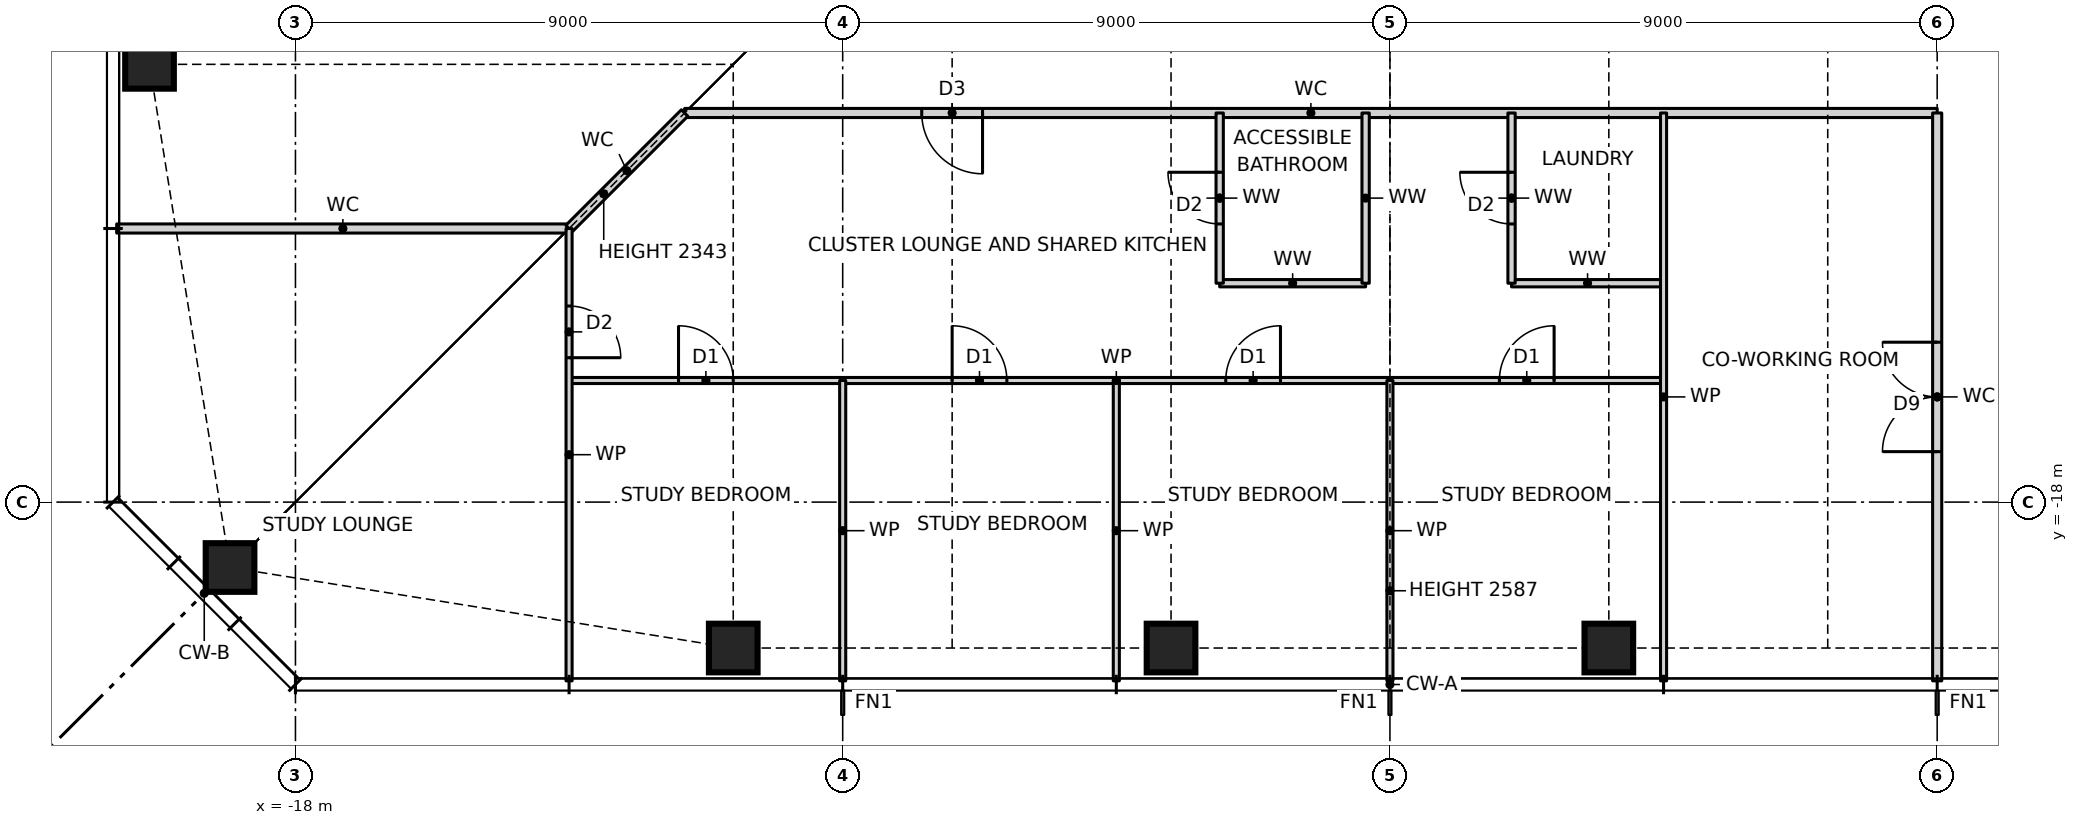
"""IFC4 building model, lengths in metres.
Left out: names, types, materials, properties, quantities, classifications, styles, units other than length and angle.
Written with IfcOpenShell. Run it as: python <this file> out.ifc"""

import sys

from ifc_helpers import new_model, si_unit, direction, frame, frame_2d, origin, origin_2d, place, context, subcontext, project, spatial, rectangle, hollow_rectangle, extrude, element, fill, save


model = new_model("IFC4")
c1 = context("Model", 3, precision=1e-05, world=origin(), true_north=direction((0.0, 1.0)))
c2 = subcontext(c1, "Body", "Model", "MODEL_VIEW")
j1 = project(units=[si_unit("LENGTHUNIT", "METRE"), si_unit("PLANEANGLEUNIT", "RADIAN")], contexts=[c1])
p1 = place(None, origin())
s1 = spatial("IfcSite", under=j1, at=p1, CompositionType="ELEMENT")
p2 = place(p1, origin())
s2 = spatial("IfcBuilding", under=s1, at=p2, CompositionType="ELEMENT")
p3 = place(p2, frame((0.0, 0.0, 119.0)))
s3 = spatial("IfcBuildingStorey", under=s2, at=p3, CompositionType="ELEMENT", Elevation=119.0)
for number, where, z_axis, x_axis in (
    (1, (-19.076, -19.076, 0.0), (0.0, 0.0, 1.0), (1.0, 0.0, 0.0)),
    (2, (-10.8, -20.4, 0.0), (0.0, 0.0, 1.0), (1.0, 0.0, 0.0)),
    (3, (-3.6, -20.4, 0.0), (0.0, 0.0, 1.0), (1.0, 0.0, 0.0)),
    (4, (3.6, -20.4, 0.0), (0.0, 0.0, 1.0), (1.0, 0.0, 0.0)),
    (5, (-20.4, -10.8, 0.0), (0.0, 0.0, 1.0), (1.0, 0.0, 0.0)),
):
    element("IfcColumn", number, at=place(p3, frame(where, z_axis=z_axis, x_axis=x_axis)), inside=s3, PredefinedType="COLUMN", context=c2, shape_type="SweptSolid", body=[
        extrude(hollow_rectangle(XDim=0.8, YDim=0.8, WallThickness=0.07, at=origin_2d()), origin(), (0.0, 0.0, 1.0), 3.5),
    ])
p4 = place(p3, frame((-13.5, -16.0, 0.0), z_axis=(0.0, 0.0, 1.0), x_axis=(1.0, 0.0, 0.0)))
e6 = element("IfcWall", 6, at=p4, inside=s3, PredefinedType="PARTITIONING", context=c2, shape_type="SweptSolid", body=[
    extrude(rectangle(XDim=18.0, YDim=0.1, at=frame_2d((9.0, 0.0))), origin(), (0.0, 0.0, 1.0), 3.27),
])
p5 = place(p4, frame((1.8, 0.0, 0.0)))
e7 = element("IfcOpeningElement", 7, at=p5, cuts=e6, PredefinedType="OPENING", context=c2, shape_type="SweptSolid", body=[
    extrude(rectangle(XDim=0.9, YDim=2.1, at=frame_2d((0.45, 1.05))), frame((0.0, 0.06, 0.0), z_axis=(0.0, -1.0, 0.0), x_axis=(1.0, 0.0, 0.0)), (0.0, 0.0, 1.0), 0.12),
])
p6 = place(p4, frame((6.3, 0.0, 0.0)))
e8 = element("IfcOpeningElement", 8, at=p6, cuts=e6, PredefinedType="OPENING", context=c2, shape_type="SweptSolid", body=[
    extrude(rectangle(XDim=0.9, YDim=2.1, at=frame_2d((0.45, 1.05))), frame((0.0, 0.06, 0.0), z_axis=(0.0, -1.0, 0.0), x_axis=(1.0, 0.0, 0.0)), (0.0, 0.0, 1.0), 0.12),
])
p7 = place(p4, frame((10.8, 0.0, 0.0)))
e9 = element("IfcOpeningElement", 9, at=p7, cuts=e6, PredefinedType="OPENING", context=c2, shape_type="SweptSolid", body=[
    extrude(rectangle(XDim=0.9, YDim=2.1, at=frame_2d((0.45, 1.05))), frame((0.0, 0.06, 0.0), z_axis=(0.0, -1.0, 0.0), x_axis=(1.0, 0.0, 0.0)), (0.0, 0.0, 1.0), 0.12),
])
p8 = place(p4, frame((15.3, 0.0, 0.0)))
e10 = element("IfcOpeningElement", 10, at=p8, cuts=e6, PredefinedType="OPENING", context=c2, shape_type="SweptSolid", body=[
    extrude(rectangle(XDim=0.9, YDim=2.1, at=frame_2d((0.45, 1.05))), frame((0.0, 0.06, 0.0), z_axis=(0.0, -1.0, 0.0), x_axis=(1.0, 0.0, 0.0)), (0.0, 0.0, 1.0), 0.12),
])
p9 = place(p3, frame((-2.8, -14.4, 0.0), z_axis=(0.0, 0.0, 1.0), x_axis=(1.0, 0.0, 0.0)))
e11 = element("IfcWall", 11, at=p9, inside=s3, PredefinedType="PARTITIONING", context=c2, shape_type="SweptSolid", body=[
    extrude(rectangle(XDim=2.4, YDim=0.12, at=frame_2d((1.2, 0.0))), origin(), (0.0, 0.0, 1.0), 3.27),
])
p10 = place(p3, frame((2.0, -14.4, 0.0), z_axis=(0.0, 0.0, 1.0), x_axis=(1.0, 0.0, 0.0)))
e12 = element("IfcWall", 12, at=p10, inside=s3, PredefinedType="PARTITIONING", context=c2, shape_type="SweptSolid", body=[
    extrude(rectangle(XDim=2.5, YDim=0.12, at=frame_2d((1.25, 0.0))), origin(), (0.0, 0.0, 1.0), 3.27),
])
p11 = place(p3, frame((-20.94, -13.5, 0.0), z_axis=(0.0, 0.0, 1.0), x_axis=(1.0, 0.0, 0.0)))
e13 = element("IfcWall", 13, at=p11, inside=s3, PredefinedType="PARTITIONING", context=c2, shape_type="SweptSolid", body=[
    extrude(rectangle(XDim=7.44, YDim=0.15, at=frame_2d((3.72, 0.0))), origin(), (0.0, 0.0, 1.0), 3.27),
])
p12 = place(p3, frame((-11.6, -11.6, 0.0), z_axis=(0.0, 0.0, 1.0), x_axis=(1.0, 0.0, 0.0)))
e14 = element("IfcWall", 14, at=p12, inside=s3, PredefinedType="PARTITIONING", context=c2, shape_type="SweptSolid", body=[
    extrude(rectangle(XDim=20.6, YDim=0.15, at=frame_2d((10.3, 0.0))), origin(), (0.0, 0.0, 1.0), 3.27),
])
p13 = place(p12, frame((3.9, 0.0, 0.0)))
e15 = element("IfcOpeningElement", 15, at=p13, cuts=e14, PredefinedType="OPENING", context=c2, shape_type="SweptSolid", body=[
    extrude(rectangle(XDim=1.0, YDim=2.1, at=frame_2d((0.5, 1.05))), frame((0.0, 0.085, 0.0), z_axis=(0.0, -1.0, 0.0), x_axis=(1.0, 0.0, 0.0)), (0.0, 0.0, 1.0), 0.17),
])
p14 = place(p3, frame((-13.5, -13.5, 0.0), z_axis=(0.0, 0.0, 1.0), x_axis=(0.707106781187, 0.707106781187, 0.0)))
e16 = element("IfcWall", 16, at=p14, inside=s3, PredefinedType="PARTITIONING", context=c2, shape_type="SweptSolid", body=[
    extrude(rectangle(XDim=2.687, YDim=0.15, at=frame_2d((1.343, 0.0))), origin(), (0.0, 0.0, 1.0), 2.343),
])
p15 = place(p3, frame((9.0, -20.94, 0.0), z_axis=(0.0, 0.0, 1.0), x_axis=(0.0, 1.0, 0.0)))
e17 = element("IfcWall", 17, at=p15, inside=s3, PredefinedType="PARTITIONING", context=c2, shape_type="SweptSolid", body=[
    extrude(rectangle(XDim=9.34, YDim=0.15, at=frame_2d((4.67, 0.0))), origin(), (0.0, 0.0, 1.0), 3.27),
])
p16 = place(p15, frame((3.77, 0.0, 0.0)))
e18 = element("IfcOpeningElement", 18, at=p16, cuts=e17, PredefinedType="OPENING", context=c2, shape_type="SweptSolid", body=[
    extrude(rectangle(XDim=1.8, YDim=2.1, at=frame_2d((0.9, 1.05))), frame((0.0, 0.085, 0.0), z_axis=(0.0, -1.0, 0.0), x_axis=(1.0, 0.0, 0.0)), (0.0, 0.0, 1.0), 0.17),
])
p17 = place(p3, frame((4.5, -20.94, 0.0), z_axis=(0.0, 0.0, 1.0), x_axis=(0.0, 1.0, 0.0)))
e19 = element("IfcWall", 19, at=p17, inside=s3, PredefinedType="PARTITIONING", context=c2, shape_type="SweptSolid", body=[
    extrude(rectangle(XDim=9.34, YDim=0.1, at=frame_2d((4.67, 0.0))), origin(), (0.0, 0.0, 1.0), 3.27),
])
p18 = place(p3, frame((2.0, -14.4, 0.0), z_axis=(0.0, 0.0, 1.0), x_axis=(0.0, 1.0, 0.0)))
e20 = element("IfcWall", 20, at=p18, inside=s3, PredefinedType="PARTITIONING", context=c2, shape_type="SweptSolid", body=[
    extrude(rectangle(XDim=2.8, YDim=0.12, at=frame_2d((1.4, 0.0))), origin(), (0.0, 0.0, 1.0), 3.27),
])
p19 = place(p18, frame((0.975, 0.0, 0.0)))
e21 = element("IfcOpeningElement", 21, at=p19, cuts=e20, PredefinedType="OPENING", context=c2, shape_type="SweptSolid", body=[
    extrude(rectangle(XDim=0.85, YDim=2.1, at=frame_2d((0.425, 1.05))), frame((0.0, 0.07, 0.0), z_axis=(0.0, -1.0, 0.0), x_axis=(1.0, 0.0, 0.0)), (0.0, 0.0, 1.0), 0.14),
])
p20 = place(p3, frame((0.0, -20.94, 0.0), z_axis=(0.0, 0.0, 1.0), x_axis=(0.0, 1.0, 0.0)))
e22 = element("IfcWall", 22, at=p20, inside=s3, PredefinedType="PARTITIONING", context=c2, shape_type="SweptSolid", body=[
    extrude(rectangle(XDim=4.94, YDim=0.1, at=frame_2d((2.47, 0.0))), origin(), (0.0, 0.0, 1.0), 2.587),
])
p21 = place(p3, frame((-0.4, -14.4, 0.0), z_axis=(0.0, 0.0, 1.0), x_axis=(0.0, 1.0, 0.0)))
e23 = element("IfcWall", 23, at=p21, inside=s3, PredefinedType="PARTITIONING", context=c2, shape_type="SweptSolid", body=[
    extrude(rectangle(XDim=2.8, YDim=0.12, at=frame_2d((1.4, 0.0))), origin(), (0.0, 0.0, 1.0), 3.27),
])
p22 = place(p3, frame((-2.8, -14.4, 0.0), z_axis=(0.0, 0.0, 1.0), x_axis=(0.0, 1.0, 0.0)))
e24 = element("IfcWall", 24, at=p22, inside=s3, PredefinedType="PARTITIONING", context=c2, shape_type="SweptSolid", body=[
    extrude(rectangle(XDim=2.8, YDim=0.12, at=frame_2d((1.4, 0.0))), origin(), (0.0, 0.0, 1.0), 3.27),
])
p23 = place(p22, frame((0.975, 0.0, 0.0)))
e25 = element("IfcOpeningElement", 25, at=p23, cuts=e24, PredefinedType="OPENING", context=c2, shape_type="SweptSolid", body=[
    extrude(rectangle(XDim=0.85, YDim=2.1, at=frame_2d((0.425, 1.05))), frame((0.0, 0.07, 0.0), z_axis=(0.0, -1.0, 0.0), x_axis=(1.0, 0.0, 0.0)), (0.0, 0.0, 1.0), 0.14),
])
for number, where, z_axis, x_axis in (
    (26, (-4.5, -20.94, 0.0), (0.0, 0.0, 1.0), (0.0, 1.0, 0.0)),
    (27, (-9.0, -20.94, 0.0), (0.0, 0.0, 1.0), (0.0, 1.0, 0.0)),
):
    element("IfcWall", number, at=place(p3, frame(where, z_axis=z_axis, x_axis=x_axis)), inside=s3, PredefinedType="PARTITIONING", context=c2, shape_type="SweptSolid", body=[
        extrude(rectangle(XDim=4.94, YDim=0.1, at=frame_2d((2.47, 0.0))), origin(), (0.0, 0.0, 1.0), 3.27),
    ])
p24 = place(p3, frame((-13.5, -20.94, 0.0), z_axis=(0.0, 0.0, 1.0), x_axis=(0.0, 1.0, 0.0)))
e28 = element("IfcWall", 28, at=p24, inside=s3, PredefinedType="PARTITIONING", context=c2, shape_type="SweptSolid", body=[
    extrude(rectangle(XDim=7.44, YDim=0.1, at=frame_2d((3.72, 0.0))), origin(), (0.0, 0.0, 1.0), 3.27),
])
p25 = place(p24, frame((5.315, 0.0, 0.0)))
e29 = element("IfcOpeningElement", 29, at=p25, cuts=e28, PredefinedType="OPENING", context=c2, shape_type="SweptSolid", body=[
    extrude(rectangle(XDim=0.85, YDim=2.1, at=frame_2d((0.425, 1.05))), frame((0.0, 0.06, 0.0), z_axis=(0.0, -1.0, 0.0), x_axis=(1.0, 0.0, 0.0)), (0.0, 0.0, 1.0), 0.12),
])
p26 = place(p5, origin())
e30 = element("IfcDoor", 30, at=p26, inside=s3, OperationType="SINGLE_SWING_LEFT", PredefinedType="DOOR", context=c2, shape_type="SweptSolid", body=[
    extrude(rectangle(XDim=0.9, YDim=2.1, at=frame_2d((0.45, 1.05))), frame((0.0, 0.025, 0.0), z_axis=(0.0, -1.0, 0.0), x_axis=(1.0, 0.0, 0.0)), (0.0, 0.0, 1.0), 0.05),
])
fill(e7, e30)
p27 = place(p6, origin())
e31 = element("IfcDoor", 31, at=p27, inside=s3, OperationType="SINGLE_SWING_LEFT", PredefinedType="DOOR", context=c2, shape_type="SweptSolid", body=[
    extrude(rectangle(XDim=0.9, YDim=2.1, at=frame_2d((0.45, 1.05))), frame((0.0, 0.025, 0.0), z_axis=(0.0, -1.0, 0.0), x_axis=(1.0, 0.0, 0.0)), (0.0, 0.0, 1.0), 0.05),
])
fill(e8, e31)
p28 = place(p7, origin())
e32 = element("IfcDoor", 32, at=p28, inside=s3, OperationType="SINGLE_SWING_RIGHT", PredefinedType="DOOR", context=c2, shape_type="SweptSolid", body=[
    extrude(rectangle(XDim=0.9, YDim=2.1, at=frame_2d((0.45, 1.05))), frame((0.0, 0.025, 0.0), z_axis=(0.0, -1.0, 0.0), x_axis=(1.0, 0.0, 0.0)), (0.0, 0.0, 1.0), 0.05),
])
fill(e9, e32)
p29 = place(p8, origin())
e33 = element("IfcDoor", 33, at=p29, inside=s3, OperationType="SINGLE_SWING_RIGHT", PredefinedType="DOOR", context=c2, shape_type="SweptSolid", body=[
    extrude(rectangle(XDim=0.9, YDim=2.1, at=frame_2d((0.45, 1.05))), frame((0.0, 0.025, 0.0), z_axis=(0.0, -1.0, 0.0), x_axis=(1.0, 0.0, 0.0)), (0.0, 0.0, 1.0), 0.05),
])
fill(e10, e33)
p30 = place(p13, frame((1.0, 0.0, 0.0), z_axis=(0.0, 0.0, 1.0), x_axis=(-1.0, 0.0, 0.0)))
e34 = element("IfcDoor", 34, at=p30, inside=s3, OperationType="SINGLE_SWING_LEFT", PredefinedType="DOOR", context=c2, shape_type="SweptSolid", body=[
    extrude(rectangle(XDim=1.0, YDim=2.1, at=frame_2d((0.5, 1.05))), frame((0.0, 0.025, 0.0), z_axis=(0.0, -1.0, 0.0), x_axis=(1.0, 0.0, 0.0)), (0.0, 0.0, 1.0), 0.05),
])
fill(e15, e34)
p31 = place(p23, origin())
e35 = element("IfcDoor", 35, at=p31, inside=s3, OperationType="SINGLE_SWING_RIGHT", PredefinedType="DOOR", context=c2, shape_type="SweptSolid", body=[
    extrude(rectangle(XDim=0.85, YDim=2.1, at=frame_2d((0.425, 1.05))), frame((0.0, 0.025, 0.0), z_axis=(0.0, -1.0, 0.0), x_axis=(1.0, 0.0, 0.0)), (0.0, 0.0, 1.0), 0.05),
])
fill(e25, e35)
p32 = place(p19, origin())
e36 = element("IfcDoor", 36, at=p32, inside=s3, OperationType="SINGLE_SWING_RIGHT", PredefinedType="DOOR", context=c2, shape_type="SweptSolid", body=[
    extrude(rectangle(XDim=0.85, YDim=2.1, at=frame_2d((0.425, 1.05))), frame((0.0, 0.025, 0.0), z_axis=(0.0, -1.0, 0.0), x_axis=(1.0, 0.0, 0.0)), (0.0, 0.0, 1.0), 0.05),
])
fill(e21, e36)
p33 = place(p16, origin())
e37 = element("IfcDoor", 37, at=p33, inside=s3, OperationType="DOUBLE_DOOR_SINGLE_SWING", PredefinedType="DOOR", context=c2, shape_type="SweptSolid", body=[
    extrude(rectangle(XDim=1.8, YDim=2.1, at=frame_2d((0.9, 1.05))), frame((0.0, 0.025, 0.0), z_axis=(0.0, -1.0, 0.0), x_axis=(1.0, 0.0, 0.0)), (0.0, 0.0, 1.0), 0.05),
])
fill(e18, e37)
p34 = place(p25, frame((0.85, 0.0, 0.0), z_axis=(0.0, 0.0, 1.0), x_axis=(-1.0, 0.0, 0.0)))
e38 = element("IfcDoor", 38, at=p34, inside=s3, OperationType="SINGLE_SWING_RIGHT", PredefinedType="DOOR", context=c2, shape_type="SweptSolid", body=[
    extrude(rectangle(XDim=0.85, YDim=2.1, at=frame_2d((0.425, 1.05))), frame((0.0, 0.025, 0.0), z_axis=(0.0, -1.0, 0.0), x_axis=(1.0, 0.0, 0.0)), (0.0, 0.0, 1.0), 0.05),
])
fill(e29, e38)
save(model, sys.argv[1])
